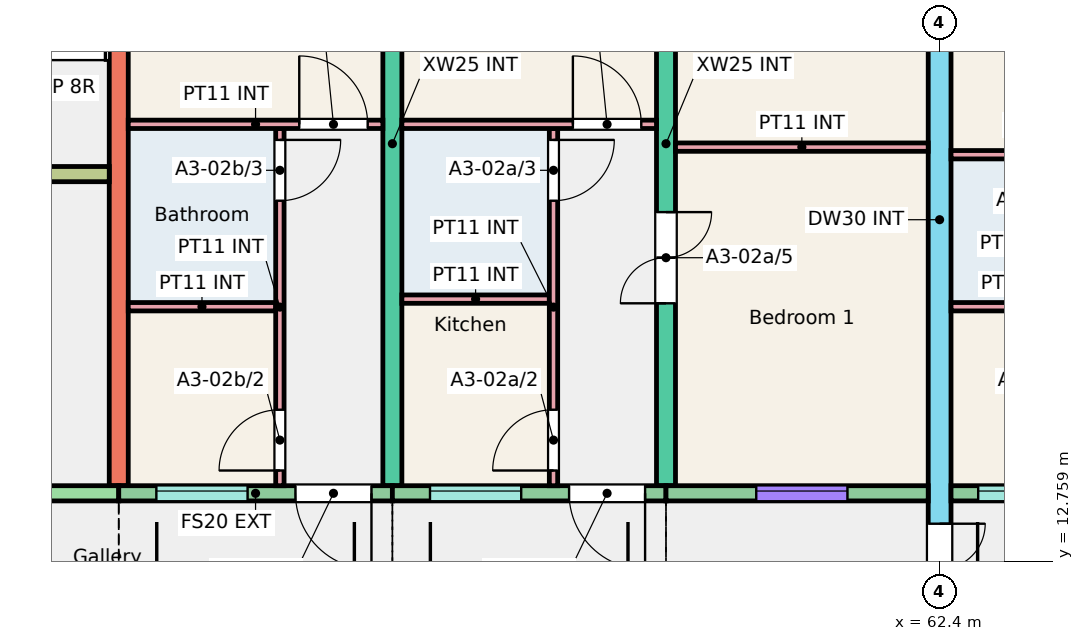
"""IFC4 building model, lengths in metres.
Left out: names, types, materials, properties, quantities, classifications, styles, units other than length and angle.
Written with IfcOpenShell. Run it as: python <this file> out.ifc"""

import sys

from ifc_helpers import new_model, si_unit, direction, frame, frame_2d, origin, place, context, subcontext, project, spatial, rectangle, extrude, element, fill, save


model = new_model("IFC4")
c1 = context("Model", 3, precision=1e-05, world=origin(), true_north=direction((0.0, 1.0)))
c2 = subcontext(c1, "Body", "Model", "MODEL_VIEW")
j1 = project(units=[si_unit("LENGTHUNIT", "METRE"), si_unit("PLANEANGLEUNIT", "RADIAN")], contexts=[c1])
p1 = place(None, origin())
s1 = spatial("IfcSite", under=j1, at=p1, CompositionType="ELEMENT")
p2 = place(p1, origin())
s2 = spatial("IfcBuilding", under=s1, at=p2, CompositionType="ELEMENT")
p3 = place(p2, frame((0.0, 0.0, 6.0)))
s3 = spatial("IfcBuildingStorey", under=s2, at=p3, CompositionType="ELEMENT", Elevation=6.0)
for number, where, z_axis, x_axis in (
    (1, (51.6, 13.75, 0.0), (0.0, 0.0, 1.0), (0.0, 1.0, 0.0)),
    (2, (55.2, 13.75, 0.0), (0.0, 0.0, 1.0), (0.0, 1.0, 0.0)),
):
    element("IfcWall", number, at=place(p3, frame(where, z_axis=z_axis, x_axis=x_axis)), inside=s3, PredefinedType="SHEAR", context=c2, shape_type="SweptSolid", body=[
        extrude(rectangle(XDim=9.0, YDim=0.25, at=frame_2d((4.5, 0.0))), origin(), (0.0, 0.0, 1.0), 3.0),
    ])
p4 = place(p3, frame((58.8, 13.75, 0.0), z_axis=(0.0, 0.0, 1.0), x_axis=(0.0, 1.0, 0.0)))
e3 = element("IfcWall", 3, at=p4, inside=s3, PredefinedType="SHEAR", context=c2, shape_type="SweptSolid", body=[
    extrude(rectangle(XDim=9.0, YDim=0.25, at=frame_2d((4.5, 0.0))), origin(), (0.0, 0.0, 1.0), 3.0),
])
p5 = place(p4, frame((2.4, 0.0, 0.0)))
e4 = element("IfcOpeningElement", 4, at=p5, cuts=e3, PredefinedType="OPENING", context=c2, shape_type="SweptSolid", body=[
    extrude(rectangle(XDim=1.2, YDim=2.1, at=frame_2d((0.6, 1.05))), frame((0.0, 0.135, 0.0), z_axis=(0.0, -1.0, 0.0), x_axis=(1.0, 0.0, 0.0)), (0.0, 0.0, 1.0), 0.27),
])
p6 = place(p4, frame((6.4, 0.0, 0.0)))
e5 = element("IfcOpeningElement", 5, at=p6, cuts=e3, PredefinedType="OPENING", context=c2, shape_type="SweptSolid", body=[
    extrude(rectangle(XDim=1.2, YDim=2.1, at=frame_2d((0.6, 1.05))), frame((0.0, 0.135, 0.0), z_axis=(0.0, -1.0, 0.0), x_axis=(1.0, 0.0, 0.0)), (0.0, 0.0, 1.0), 0.27),
])
p7 = place(p3, frame((62.4, 11.75, 0.0), z_axis=(0.0, 0.0, 1.0), x_axis=(0.0, 1.0, 0.0)))
e6 = element("IfcWall", 6, at=p7, inside=s3, PredefinedType="SHEAR", context=c2, shape_type="SweptSolid", body=[
    extrude(rectangle(XDim=11.0, YDim=0.3, at=frame_2d((5.5, 0.0))), origin(), (0.0, 0.0, 1.0), 3.0),
])
p8 = place(p7, frame((0.3, 0.0, 0.0)))
e7 = element("IfcOpeningElement", 7, at=p8, cuts=e6, PredefinedType="OPENING", context=c2, shape_type="SweptSolid", body=[
    extrude(rectangle(XDim=1.2, YDim=2.1, at=frame_2d((0.6, 1.05))), frame((0.0, 0.16, 0.0), z_axis=(0.0, -1.0, 0.0), x_axis=(1.0, 0.0, 0.0)), (0.0, 0.0, 1.0), 0.32),
])
p9 = place(p3, frame((45.75, 13.65, 0.0), z_axis=(0.0, 0.0, 1.0), x_axis=(1.0, 0.0, 0.0)))
e8 = element("IfcWall", 8, at=p9, inside=s3, PredefinedType="SHEAR", context=c2, shape_type="SweptSolid", body=[
    extrude(rectangle(XDim=5.85, YDim=0.2, at=frame_2d((2.925, 0.0))), origin(), (0.0, 0.0, 1.0), 3.0),
])
p10 = place(p9, frame((2.312, 0.0, 0.0)))
e9 = element("IfcOpeningElement", 9, at=p10, cuts=e8, PredefinedType="OPENING", context=c2, shape_type="SweptSolid", body=[
    extrude(rectangle(XDim=1.1, YDim=2.1, at=frame_2d((0.55, 1.05))), frame((0.0, 0.11, 0.0), z_axis=(0.0, -1.0, 0.0), x_axis=(1.0, 0.0, 0.0)), (0.0, 0.0, 1.0), 0.22),
])
p11 = place(p3, frame((45.75, 17.85, 0.0), z_axis=(0.0, 0.0, 1.0), x_axis=(1.0, 0.0, 0.0)))
e10 = element("IfcWall", 10, at=p11, inside=s3, PredefinedType="SHEAR", context=c2, shape_type="SweptSolid", body=[
    extrude(rectangle(XDim=5.725, YDim=0.2, at=frame_2d((2.863, 0.0))), origin(), (0.0, 0.0, 1.0), 3.0),
])
p12 = place(p11, frame((3.775, 0.0, 0.0)))
e11 = element("IfcOpeningElement", 11, at=p12, cuts=e10, PredefinedType="OPENING", context=c2, shape_type="SweptSolid", body=[
    extrude(rectangle(XDim=1.0, YDim=2.1, at=frame_2d((0.5, 1.05))), frame((0.0, 0.11, 0.0), z_axis=(0.0, -1.0, 0.0), x_axis=(1.0, 0.0, 0.0)), (0.0, 0.0, 1.0), 0.22),
])
p13 = place(p11, frame((0.762, 0.0, 0.0)))
e12 = element("IfcOpeningElement", 12, at=p13, cuts=e10, PredefinedType="OPENING", context=c2, shape_type="SweptSolid", body=[
    extrude(rectangle(XDim=1.1, YDim=2.1, at=frame_2d((0.55, 1.05))), frame((0.0, 0.11, 0.0), z_axis=(0.0, -1.0, 0.0), x_axis=(1.0, 0.0, 0.0)), (0.0, 0.0, 1.0), 0.22),
])
p14 = place(p3, frame((51.6, 13.65, 0.0), z_axis=(0.0, 0.0, 1.0), x_axis=(1.0, 0.0, 0.0)))
e13 = element("IfcWall", 13, at=p14, inside=s3, PredefinedType="SOLIDWALL", context=c2, shape_type="SweptSolid", body=[
    extrude(rectangle(XDim=3.6, YDim=0.2, at=frame_2d((1.8, 0.0))), origin(), (0.0, 0.0, 1.0), 3.0),
])
p15 = place(p14, frame((0.495, 0.0, 1.1)))
e14 = element("IfcOpeningElement", 14, at=p15, cuts=e13, PredefinedType="OPENING", context=c2, shape_type="SweptSolid", body=[
    extrude(rectangle(XDim=1.2, YDim=1.3, at=frame_2d((0.6, 0.65))), frame((0.0, 0.11, 0.0), z_axis=(0.0, -1.0, 0.0), x_axis=(1.0, 0.0, 0.0)), (0.0, 0.0, 1.0), 0.22),
])
p16 = place(p14, frame((2.325, 0.0, 0.0)))
e15 = element("IfcOpeningElement", 15, at=p16, cuts=e13, PredefinedType="OPENING", context=c2, shape_type="SweptSolid", body=[
    extrude(rectangle(XDim=1.0, YDim=2.1, at=frame_2d((0.5, 1.05))), frame((0.0, 0.11, 0.0), z_axis=(0.0, -1.0, 0.0), x_axis=(1.0, 0.0, 0.0)), (0.0, 0.0, 1.0), 0.22),
])
p17 = place(p3, frame((55.2, 13.65, 0.0), z_axis=(0.0, 0.0, 1.0), x_axis=(1.0, 0.0, 0.0)))
e16 = element("IfcWall", 16, at=p17, inside=s3, PredefinedType="SOLIDWALL", context=c2, shape_type="SweptSolid", body=[
    extrude(rectangle(XDim=3.6, YDim=0.2, at=frame_2d((1.8, 0.0))), origin(), (0.0, 0.0, 1.0), 3.0),
])
p18 = place(p17, frame((0.495, 0.0, 1.1)))
e17 = element("IfcOpeningElement", 17, at=p18, cuts=e16, PredefinedType="OPENING", context=c2, shape_type="SweptSolid", body=[
    extrude(rectangle(XDim=1.2, YDim=1.3, at=frame_2d((0.6, 0.65))), frame((0.0, 0.11, 0.0), z_axis=(0.0, -1.0, 0.0), x_axis=(1.0, 0.0, 0.0)), (0.0, 0.0, 1.0), 0.22),
])
p19 = place(p17, frame((2.325, 0.0, 0.0)))
e18 = element("IfcOpeningElement", 18, at=p19, cuts=e16, PredefinedType="OPENING", context=c2, shape_type="SweptSolid", body=[
    extrude(rectangle(XDim=1.0, YDim=2.1, at=frame_2d((0.5, 1.05))), frame((0.0, 0.11, 0.0), z_axis=(0.0, -1.0, 0.0), x_axis=(1.0, 0.0, 0.0)), (0.0, 0.0, 1.0), 0.22),
])
p20 = place(p3, frame((58.8, 13.65, 0.0), z_axis=(0.0, 0.0, 1.0), x_axis=(1.0, 0.0, 0.0)))
e19 = element("IfcWall", 19, at=p20, inside=s3, PredefinedType="SOLIDWALL", context=c2, shape_type="SweptSolid", body=[
    extrude(rectangle(XDim=3.45, YDim=0.2, at=frame_2d((1.725, 0.0))), origin(), (0.0, 0.0, 1.0), 3.0),
])
p21 = place(p20, frame((1.188, 0.0, 0.8)))
e20 = element("IfcOpeningElement", 20, at=p21, cuts=e19, PredefinedType="OPENING", context=c2, shape_type="SweptSolid", body=[
    extrude(rectangle(XDim=1.2, YDim=1.6, at=frame_2d((0.6, 0.8))), frame((0.0, 0.11, 0.0), z_axis=(0.0, -1.0, 0.0), x_axis=(1.0, 0.0, 0.0)), (0.0, 0.0, 1.0), 0.22),
])
p22 = place(p3, frame((62.55, 13.65, 0.0), z_axis=(0.0, 0.0, 1.0), x_axis=(1.0, 0.0, 0.0)))
e21 = element("IfcWall", 21, at=p22, inside=s3, PredefinedType="SOLIDWALL", context=c2, shape_type="SweptSolid", body=[
    extrude(rectangle(XDim=3.45, YDim=0.2, at=frame_2d((1.725, 0.0))), origin(), (0.0, 0.0, 1.0), 3.0),
])
p23 = place(p22, frame((0.357, 0.0, 1.1)))
e22 = element("IfcOpeningElement", 22, at=p23, cuts=e21, PredefinedType="OPENING", context=c2, shape_type="SweptSolid", body=[
    extrude(rectangle(XDim=1.2, YDim=1.3, at=frame_2d((0.6, 0.65))), frame((0.0, 0.11, 0.0), z_axis=(0.0, -1.0, 0.0), x_axis=(1.0, 0.0, 0.0)), (0.0, 0.0, 1.0), 0.22),
])
p24 = place(p22, frame((2.175, 0.0, 0.0)))
e23 = element("IfcOpeningElement", 23, at=p24, cuts=e21, PredefinedType="OPENING", context=c2, shape_type="SweptSolid", body=[
    extrude(rectangle(XDim=1.0, YDim=2.1, at=frame_2d((0.5, 1.05))), frame((0.0, 0.11, 0.0), z_axis=(0.0, -1.0, 0.0), x_axis=(1.0, 0.0, 0.0)), (0.0, 0.0, 1.0), 0.22),
])
p25 = place(p3, frame((55.325, 16.205, 0.0), z_axis=(0.0, 0.0, 1.0), x_axis=(1.0, 0.0, 0.0)))
e24 = element("IfcWall", 24, at=p25, inside=s3, PredefinedType="PARTITIONING", context=c2, shape_type="SweptSolid", body=[
    extrude(rectangle(XDim=1.94, YDim=0.11, at=frame_2d((0.97, 0.0))), origin(), (0.0, 0.0, 1.0), 2.8),
])
p26 = place(p3, frame((57.32, 13.75, 0.0), z_axis=(0.0, 0.0, 1.0), x_axis=(0.0, 1.0, 0.0)))
e25 = element("IfcWall", 25, at=p26, inside=s3, PredefinedType="PARTITIONING", context=c2, shape_type="SweptSolid", body=[
    extrude(rectangle(XDim=4.7, YDim=0.11, at=frame_2d((2.35, 0.0))), origin(), (0.0, 0.0, 1.0), 2.8),
])
p27 = place(p26, frame((0.2, 0.0, 0.0)))
e26 = element("IfcOpeningElement", 26, at=p27, cuts=e25, PredefinedType="OPENING", context=c2, shape_type="SweptSolid", body=[
    extrude(rectangle(XDim=0.8, YDim=2.1, at=frame_2d((0.4, 1.05))), frame((0.0, 0.065, 0.0), z_axis=(0.0, -1.0, 0.0), x_axis=(1.0, 0.0, 0.0)), (0.0, 0.0, 1.0), 0.13),
])
p28 = place(p26, frame((3.75, 0.0, 0.0)))
e27 = element("IfcOpeningElement", 27, at=p28, cuts=e25, PredefinedType="OPENING", context=c2, shape_type="SweptSolid", body=[
    extrude(rectangle(XDim=0.8, YDim=2.1, at=frame_2d((0.4, 1.05))), frame((0.0, 0.065, 0.0), z_axis=(0.0, -1.0, 0.0), x_axis=(1.0, 0.0, 0.0)), (0.0, 0.0, 1.0), 0.13),
])
p29 = place(p3, frame((55.325, 18.505, 0.0), z_axis=(0.0, 0.0, 1.0), x_axis=(1.0, 0.0, 0.0)))
e28 = element("IfcWall", 28, at=p29, inside=s3, PredefinedType="PARTITIONING", context=c2, shape_type="SweptSolid", body=[
    extrude(rectangle(XDim=3.35, YDim=0.11, at=frame_2d((1.675, 0.0))), origin(), (0.0, 0.0, 1.0), 2.8),
])
p30 = place(p29, frame((2.25, 0.0, 0.0)))
e29 = element("IfcOpeningElement", 29, at=p30, cuts=e28, PredefinedType="OPENING", context=c2, shape_type="SweptSolid", body=[
    extrude(rectangle(XDim=0.9, YDim=2.1, at=frame_2d((0.45, 1.05))), frame((0.0, 0.065, 0.0), z_axis=(0.0, -1.0, 0.0), x_axis=(1.0, 0.0, 0.0)), (0.0, 0.0, 1.0), 0.13),
])
p31 = place(p3, frame((58.925, 18.205, 0.0), z_axis=(0.0, 0.0, 1.0), x_axis=(1.0, 0.0, 0.0)))
e30 = element("IfcWall", 30, at=p31, inside=s3, PredefinedType="PARTITIONING", context=c2, shape_type="SweptSolid", body=[
    extrude(rectangle(XDim=3.325, YDim=0.11, at=frame_2d((1.663, 0.0))), origin(), (0.0, 0.0, 1.0), 2.8),
])
p32 = place(p3, frame((51.725, 16.105, 0.0), z_axis=(0.0, 0.0, 1.0), x_axis=(1.0, 0.0, 0.0)))
e31 = element("IfcWall", 31, at=p32, inside=s3, PredefinedType="PARTITIONING", context=c2, shape_type="SweptSolid", body=[
    extrude(rectangle(XDim=1.94, YDim=0.11, at=frame_2d((0.97, 0.0))), origin(), (0.0, 0.0, 1.0), 2.8),
])
p33 = place(p3, frame((53.72, 13.75, 0.0), z_axis=(0.0, 0.0, 1.0), x_axis=(0.0, 1.0, 0.0)))
e32 = element("IfcWall", 32, at=p33, inside=s3, PredefinedType="PARTITIONING", context=c2, shape_type="SweptSolid", body=[
    extrude(rectangle(XDim=4.7, YDim=0.11, at=frame_2d((2.35, 0.0))), origin(), (0.0, 0.0, 1.0), 2.8),
])
p34 = place(p33, frame((0.2, 0.0, 0.0)))
e33 = element("IfcOpeningElement", 33, at=p34, cuts=e32, PredefinedType="OPENING", context=c2, shape_type="SweptSolid", body=[
    extrude(rectangle(XDim=0.8, YDim=2.1, at=frame_2d((0.4, 1.05))), frame((0.0, 0.065, 0.0), z_axis=(0.0, -1.0, 0.0), x_axis=(1.0, 0.0, 0.0)), (0.0, 0.0, 1.0), 0.13),
])
p35 = place(p33, frame((3.75, 0.0, 0.0)))
e34 = element("IfcOpeningElement", 34, at=p35, cuts=e32, PredefinedType="OPENING", context=c2, shape_type="SweptSolid", body=[
    extrude(rectangle(XDim=0.8, YDim=2.1, at=frame_2d((0.4, 1.05))), frame((0.0, 0.065, 0.0), z_axis=(0.0, -1.0, 0.0), x_axis=(1.0, 0.0, 0.0)), (0.0, 0.0, 1.0), 0.13),
])
p36 = place(p3, frame((51.725, 18.505, 0.0), z_axis=(0.0, 0.0, 1.0), x_axis=(1.0, 0.0, 0.0)))
e35 = element("IfcWall", 35, at=p36, inside=s3, PredefinedType="PARTITIONING", context=c2, shape_type="SweptSolid", body=[
    extrude(rectangle(XDim=3.35, YDim=0.11, at=frame_2d((1.675, 0.0))), origin(), (0.0, 0.0, 1.0), 2.8),
])
p37 = place(p36, frame((2.25, 0.0, 0.0)))
e36 = element("IfcOpeningElement", 36, at=p37, cuts=e35, PredefinedType="OPENING", context=c2, shape_type="SweptSolid", body=[
    extrude(rectangle(XDim=0.9, YDim=2.1, at=frame_2d((0.45, 1.05))), frame((0.0, 0.065, 0.0), z_axis=(0.0, -1.0, 0.0), x_axis=(1.0, 0.0, 0.0)), (0.0, 0.0, 1.0), 0.13),
])
p38 = place(p3, frame((62.55, 16.105, 0.0), z_axis=(0.0, 0.0, 1.0), x_axis=(1.0, 0.0, 0.0)))
e37 = element("IfcWall", 37, at=p38, inside=s3, PredefinedType="PARTITIONING", context=c2, shape_type="SweptSolid", body=[
    extrude(rectangle(XDim=1.915, YDim=0.11, at=frame_2d((0.958, 0.0))), origin(), (0.0, 0.0, 1.0), 2.8),
])
p39 = place(p3, frame((62.55, 18.105, 0.0), z_axis=(0.0, 0.0, 1.0), x_axis=(1.0, 0.0, 0.0)))
e38 = element("IfcWall", 38, at=p39, inside=s3, PredefinedType="PARTITIONING", context=c2, shape_type="SweptSolid", body=[
    extrude(rectangle(XDim=3.325, YDim=0.11, at=frame_2d((1.663, 0.0))), origin(), (0.0, 0.0, 1.0), 2.8),
])
p40 = place(p39, frame((2.225, 0.0, 0.0)))
e39 = element("IfcOpeningElement", 39, at=p40, cuts=e38, PredefinedType="OPENING", context=c2, shape_type="SweptSolid", body=[
    extrude(rectangle(XDim=0.9, YDim=2.1, at=frame_2d((0.45, 1.05))), frame((0.0, 0.065, 0.0), z_axis=(0.0, -1.0, 0.0), x_axis=(1.0, 0.0, 0.0)), (0.0, 0.0, 1.0), 0.13),
])
p41 = place(p21, origin())
e40 = element("IfcWindow", 40, at=p41, inside=s3, PartitioningType="SINGLE_PANEL", PredefinedType="WINDOW", context=c2, shape_type="SweptSolid", body=[
    extrude(rectangle(XDim=1.2, YDim=1.6, at=frame_2d((0.6, 0.8))), frame((0.0, 0.06, 0.0), z_axis=(0.0, -1.0, 0.0), x_axis=(1.0, 0.0, 0.0)), (0.0, 0.0, 1.0), 0.06),
])
fill(e20, e40)
p42 = place(p18, origin())
e41 = element("IfcWindow", 41, at=p42, inside=s3, PartitioningType="SINGLE_PANEL", PredefinedType="WINDOW", context=c2, shape_type="SweptSolid", body=[
    extrude(rectangle(XDim=1.2, YDim=1.3, at=frame_2d((0.6, 0.65))), frame((0.0, 0.06, 0.0), z_axis=(0.0, -1.0, 0.0), x_axis=(1.0, 0.0, 0.0)), (0.0, 0.0, 1.0), 0.06),
])
fill(e17, e41)
p43 = place(p15, origin())
e42 = element("IfcWindow", 42, at=p43, inside=s3, PartitioningType="SINGLE_PANEL", PredefinedType="WINDOW", context=c2, shape_type="SweptSolid", body=[
    extrude(rectangle(XDim=1.2, YDim=1.3, at=frame_2d((0.6, 0.65))), frame((0.0, 0.06, 0.0), z_axis=(0.0, -1.0, 0.0), x_axis=(1.0, 0.0, 0.0)), (0.0, 0.0, 1.0), 0.06),
])
fill(e14, e42)
p44 = place(p23, origin())
e43 = element("IfcWindow", 43, at=p44, inside=s3, PartitioningType="SINGLE_PANEL", PredefinedType="WINDOW", context=c2, shape_type="SweptSolid", body=[
    extrude(rectangle(XDim=1.2, YDim=1.3, at=frame_2d((0.6, 0.65))), frame((0.0, 0.06, 0.0), z_axis=(0.0, -1.0, 0.0), x_axis=(1.0, 0.0, 0.0)), (0.0, 0.0, 1.0), 0.06),
])
fill(e22, e43)
p45 = place(p19, origin())
e44 = element("IfcDoor", 44, at=p45, inside=s3, OperationType="SINGLE_SWING_RIGHT", PredefinedType="DOOR", context=c2, shape_type="SweptSolid", body=[
    extrude(rectangle(XDim=1.0, YDim=2.1, at=frame_2d((0.5, 1.05))), frame((0.0, 0.025, 0.0), z_axis=(0.0, -1.0, 0.0), x_axis=(1.0, 0.0, 0.0)), (0.0, 0.0, 1.0), 0.05),
])
fill(e18, e44)
p46 = place(p27, origin())
e45 = element("IfcDoor", 45, at=p46, inside=s3, OperationType="SINGLE_SWING_LEFT", PredefinedType="DOOR", context=c2, shape_type="SweptSolid", body=[
    extrude(rectangle(XDim=0.8, YDim=2.1, at=frame_2d((0.4, 1.05))), frame((0.0, 0.025, 0.0), z_axis=(0.0, -1.0, 0.0), x_axis=(1.0, 0.0, 0.0)), (0.0, 0.0, 1.0), 0.05),
])
fill(e26, e45)
p47 = place(p28, origin())
e46 = element("IfcDoor", 46, at=p47, inside=s3, OperationType="SINGLE_SWING_RIGHT", PredefinedType="DOOR", context=c2, shape_type="SweptSolid", body=[
    extrude(rectangle(XDim=0.8, YDim=2.1, at=frame_2d((0.4, 1.05))), frame((0.0, 0.025, 0.0), z_axis=(0.0, -1.0, 0.0), x_axis=(1.0, 0.0, 0.0)), (0.0, 0.0, 1.0), 0.05),
])
fill(e27, e46)
p48 = place(p30, origin())
e47 = element("IfcDoor", 47, at=p48, inside=s3, OperationType="SINGLE_SWING_LEFT", PredefinedType="DOOR", context=c2, shape_type="SweptSolid", body=[
    extrude(rectangle(XDim=0.9, YDim=2.1, at=frame_2d((0.45, 1.05))), frame((0.0, 0.025, 0.0), z_axis=(0.0, -1.0, 0.0), x_axis=(1.0, 0.0, 0.0)), (0.0, 0.0, 1.0), 0.05),
])
fill(e29, e47)
p49 = place(p5, origin())
e48 = element("IfcDoor", 48, at=p49, inside=s3, OperationType="DOUBLE_DOOR_SINGLE_SWING", PredefinedType="DOOR", context=c2, shape_type="SweptSolid", body=[
    extrude(rectangle(XDim=1.2, YDim=2.1, at=frame_2d((0.6, 1.05))), frame((0.0, 0.025, 0.0), z_axis=(0.0, -1.0, 0.0), x_axis=(1.0, 0.0, 0.0)), (0.0, 0.0, 1.0), 0.05),
])
fill(e4, e48)
p50 = place(p16, origin())
e49 = element("IfcDoor", 49, at=p50, inside=s3, OperationType="SINGLE_SWING_RIGHT", PredefinedType="DOOR", context=c2, shape_type="SweptSolid", body=[
    extrude(rectangle(XDim=1.0, YDim=2.1, at=frame_2d((0.5, 1.05))), frame((0.0, 0.025, 0.0), z_axis=(0.0, -1.0, 0.0), x_axis=(1.0, 0.0, 0.0)), (0.0, 0.0, 1.0), 0.05),
])
fill(e15, e49)
p51 = place(p34, origin())
e50 = element("IfcDoor", 50, at=p51, inside=s3, OperationType="SINGLE_SWING_LEFT", PredefinedType="DOOR", context=c2, shape_type="SweptSolid", body=[
    extrude(rectangle(XDim=0.8, YDim=2.1, at=frame_2d((0.4, 1.05))), frame((0.0, 0.025, 0.0), z_axis=(0.0, -1.0, 0.0), x_axis=(1.0, 0.0, 0.0)), (0.0, 0.0, 1.0), 0.05),
])
fill(e33, e50)
p52 = place(p35, origin())
e51 = element("IfcDoor", 51, at=p52, inside=s3, OperationType="SINGLE_SWING_RIGHT", PredefinedType="DOOR", context=c2, shape_type="SweptSolid", body=[
    extrude(rectangle(XDim=0.8, YDim=2.1, at=frame_2d((0.4, 1.05))), frame((0.0, 0.025, 0.0), z_axis=(0.0, -1.0, 0.0), x_axis=(1.0, 0.0, 0.0)), (0.0, 0.0, 1.0), 0.05),
])
fill(e34, e51)
p53 = place(p37, origin())
e52 = element("IfcDoor", 52, at=p53, inside=s3, OperationType="SINGLE_SWING_LEFT", PredefinedType="DOOR", context=c2, shape_type="SweptSolid", body=[
    extrude(rectangle(XDim=0.9, YDim=2.1, at=frame_2d((0.45, 1.05))), frame((0.0, 0.025, 0.0), z_axis=(0.0, -1.0, 0.0), x_axis=(1.0, 0.0, 0.0)), (0.0, 0.0, 1.0), 0.05),
])
fill(e36, e52)
p54 = place(p8, origin())
e53 = element("IfcDoor", 53, at=p54, inside=s3, OperationType="DOUBLE_DOOR_SINGLE_SWING", PredefinedType="DOOR", context=c2, shape_type="SweptSolid", body=[
    extrude(rectangle(XDim=1.2, YDim=2.1, at=frame_2d((0.6, 1.05))), frame((0.0, 0.025, 0.0), z_axis=(0.0, -1.0, 0.0), x_axis=(1.0, 0.0, 0.0)), (0.0, 0.0, 1.0), 0.05),
])
fill(e7, e53)
save(model, sys.argv[1])
